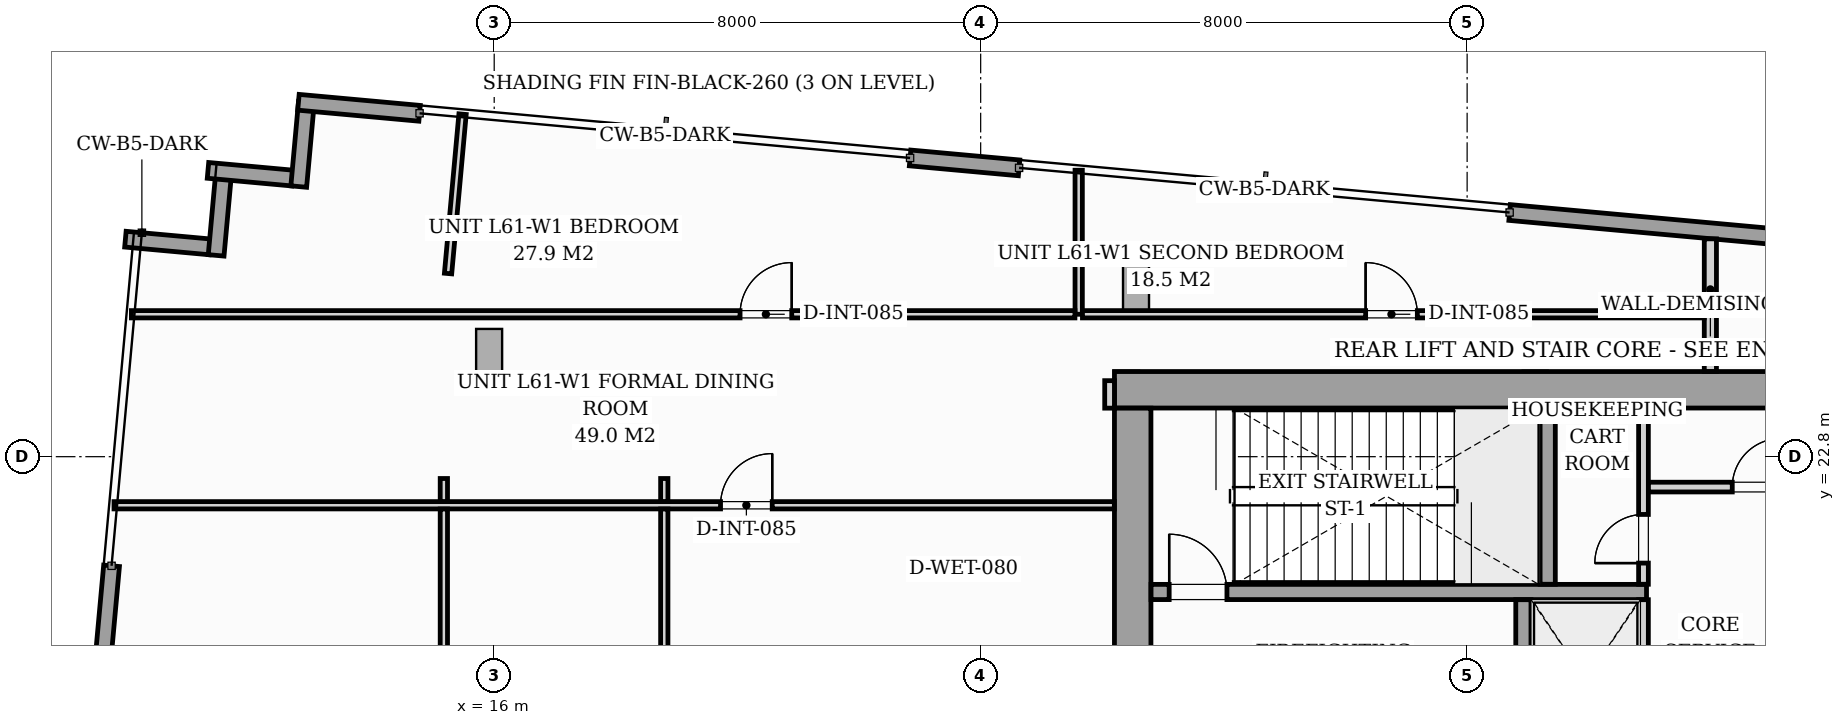
"""IFC4 building model, lengths in metres.
Left out: names, types, materials, properties, quantities, classifications, styles, units other than length and angle.
Written with IfcOpenShell. Run it as: python <this file> out.ifc"""

import sys

from ifc_helpers import new_model, si_unit, direction, frame, frame_2d, origin, origin_2d, place, context, subcontext, project, spatial, rectangle, i_section, extrude, source, transform, mapped, element, fill, save


model = new_model("IFC4")
c1 = context("Model", 3, precision=1e-05, world=origin(), true_north=direction((0.0, 1.0)))
c2 = subcontext(c1, "Body", "Model", "MODEL_VIEW")
j1 = project(units=[si_unit("LENGTHUNIT", "METRE"), si_unit("PLANEANGLEUNIT", "RADIAN")], contexts=[c1])
p1 = place(None, origin())
s1 = spatial("IfcSite", under=j1, at=p1, CompositionType="ELEMENT")
p2 = place(p1, origin())
s2 = spatial("IfcBuilding", under=s1, at=p2, CompositionType="ELEMENT")
p3 = place(p2, frame((0.0, 0.0, 211.4)))
s3 = spatial("IfcBuildingStorey", under=s2, at=p3, CompositionType="ELEMENT", Elevation=211.4)
m1 = source(origin(), c2, "Body", "SweptSolid", [
    extrude(i_section(OverallWidth=0.409, OverallDepth=0.425, WebThickness=0.033, FlangeThickness=0.052, FilletRadius=0.018, at=origin_2d()), origin(), (0.0, 0.0, 1.0), 5.196),
])
for number, where, z_axis, x_axis in (
    (1, (26.4, 24.0, 0.002), (0.0, 0.0, 1.0), (1.0, 0.0, 0.0)),
    (2, (33.12, 24.0, 0.002), (0.0, 0.0, 1.0), (1.0, 0.0, 0.0)),
):
    element("IfcColumn", number, at=place(p3, frame(where, z_axis=z_axis, x_axis=x_axis)), inside=s3, PredefinedType="PILASTER", context=c2, shape_type="MappedRepresentation", body=[
        mapped(m1, transform((0.0, 0.0, 0.0), scale=1.0)),
    ])
m2 = source(origin(), c2, "Body", "SweptSolid", [
    extrude(i_section(OverallWidth=0.427, OverallDepth=0.976, WebThickness=0.031, FlangeThickness=0.056, FilletRadius=0.024, at=origin_2d()), origin(), (0.0, 0.0, 1.0), 6.431),
])
p4 = place(p3, frame((16.533, 23.527, 0.167), z_axis=(-0.412482054012, 0.592964307558, 0.691557579005), x_axis=(0.39491439026, -0.567709881405, 0.722321337716)))
e3 = element("IfcColumn", 3, at=p4, inside=s3, PredefinedType="COLUMN", context=c2, shape_type="MappedRepresentation", body=[
    mapped(m2, transform((0.0, 0.0, 0.0), scale=1.0)),
])
m3 = source(origin(), c2, "Body", "SweptSolid", [
    extrude(i_section(OverallWidth=0.427, OverallDepth=0.976, WebThickness=0.031, FlangeThickness=0.056, FilletRadius=0.024, at=origin_2d()), origin(), (0.0, 0.0, 1.0), 5.885),
])
p5 = place(p3, frame((27.409, 25.418, 0.151), z_axis=(-0.619606937299, 0.191959912881, 0.761077285889), x_axis=(0.7269877698, -0.225227479803, 0.648661209649)))
e4 = element("IfcColumn", 4, at=p5, inside=s3, PredefinedType="COLUMN", context=c2, shape_type="MappedRepresentation", body=[
    mapped(m3, transform((0.0, 0.0, 0.0), scale=1.0)),
])
m4 = source(origin(), c2, "Body", "SweptSolid", [
    extrude(i_section(OverallWidth=0.427, OverallDepth=0.976, WebThickness=0.031, FlangeThickness=0.056, FilletRadius=0.024, at=origin_2d()), origin(), (0.0, 0.0, 1.0), 6.395),
])
p6 = place(p3, frame((38.26, 25.49, 0.166), z_axis=(-0.717757295801, 0.029854061237, 0.69565307399), x_axis=(0.695052106108, -0.028909672197, 0.718377895434)))
e5 = element("IfcColumn", 5, at=p6, inside=s3, PredefinedType="COLUMN", context=c2, shape_type="MappedRepresentation", body=[
    mapped(m4, transform((0.0, 0.0, 0.0), scale=1.0)),
])
m5 = source(origin(), c2, "Body", "SweptSolid", [
    extrude(i_section(OverallWidth=0.427, OverallDepth=0.976, WebThickness=0.031, FlangeThickness=0.056, FilletRadius=0.024, at=origin_2d()), origin(), (0.0, 0.0, 1.0), 7.437),
])
p7 = place(p3, frame((14.865, 15.359, 0.184), z_axis=(-0.53624427181, 0.600393978381, 0.593269880977), x_axis=(0.395200173603, -0.442477089191, 0.805003632492)))
e6 = element("IfcColumn", 6, at=p7, inside=s3, PredefinedType="COLUMN", context=c2, shape_type="MappedRepresentation", body=[
    mapped(m5, transform((0.0, 0.0, 0.0), scale=1.0)),
])
p8 = place(p3, frame((9.544, 19.213, 0.0), z_axis=(0.0, 0.0, 1.0), x_axis=(0.090731396305, 0.995875400703, 0.0)))
e7 = element("IfcWall", 7, at=p8, inside=s3, PredefinedType="STANDARD", context=c2, shape_type="SweptSolid", body=[
    extrude(rectangle(XDim=1.8, YDim=0.26, at=frame_2d((0.9, 0.0))), origin(), (0.0, 0.0, 1.0), 4.78),
])
for number, where, z_axis, x_axis in (
    (8, (9.935, 26.377, 0.0), (0.0, 0.0, 1.0), (0.996, -0.091, 0.0)),
    (9, (11.427, 26.111, 0.0), (0.0, 0.0, 1.0), (0.091, 0.996, 0.0)),
):
    element("IfcWall", number, at=place(p3, frame(where, z_axis=z_axis, x_axis=x_axis)), inside=s3, PredefinedType="STANDARD", context=c2, shape_type="SweptSolid", body=[
        extrude(rectangle(XDim=1.395, YDim=0.26, at=frame_2d((0.698, 0.0))), origin(), (0.0, 0.0, 1.0), 4.78),
    ])
p9 = place(p3, frame((11.293, 27.508, 0.0), z_axis=(0.0, 0.0, 1.0), x_axis=(0.995883159782, -0.090646191665, 0.0)))
e10 = element("IfcWall", 10, at=p9, inside=s3, PredefinedType="STANDARD", context=c2, shape_type="SweptSolid", body=[
    extrude(rectangle(XDim=1.395, YDim=0.26, at=frame_2d((0.698, 0.0))), origin(), (0.0, 0.0, 1.0), 4.78),
])
p10 = place(p3, frame((12.785, 27.242, 0.0), z_axis=(0.0, 0.0, 1.0), x_axis=(0.090472632758, 0.995898942023, 0.0)))
e11 = element("IfcWall", 11, at=p10, inside=s3, PredefinedType="STANDARD", context=c2, shape_type="SweptSolid", body=[
    extrude(rectangle(XDim=1.395, YDim=0.26, at=frame_2d((0.698, 0.0))), origin(), (0.0, 0.0, 1.0), 4.78),
])
p11 = place(p3, frame((12.781, 28.628, 0.0), z_axis=(0.0, 0.0, 1.0), x_axis=(0.995879187782, -0.090689819405, 0.0)))
e12 = element("IfcWall", 12, at=p11, inside=s3, PredefinedType="STANDARD", context=c2, shape_type="SweptSolid", body=[
    extrude(rectangle(XDim=2.0, YDim=0.26, at=frame_2d((1.0, 0.0))), origin(), (0.0, 0.0, 1.0), 4.78),
])
p12 = place(p3, frame((22.839, 27.713, 0.0), z_axis=(0.0, 0.0, 1.0), x_axis=(0.995887646227, -0.090596887877, 0.0)))
e13 = element("IfcWall", 13, at=p12, inside=s3, PredefinedType="STANDARD", context=c2, shape_type="SweptSolid", body=[
    extrude(rectangle(XDim=1.8, YDim=0.26, at=frame_2d((0.9, 0.0))), origin(), (0.0, 0.0, 1.0), 4.78),
])
p13 = place(p3, frame((32.698, 26.815, 0.0), z_axis=(0.0, 0.0, 1.0), x_axis=(0.995885769499, -0.09061751547, 0.0)))
e14 = element("IfcWall", 14, at=p13, inside=s3, PredefinedType="STANDARD", context=c2, shape_type="SweptSolid", body=[
    extrude(rectangle(XDim=6.73, YDim=0.26, at=frame_2d((3.365, 0.0))), origin(), (0.0, 0.0, 1.0), 4.78),
])
p14 = place(p3, frame((26.2, 23.9, 0.0), z_axis=(0.0, 0.0, 1.0), x_axis=(1.0, 0.0, 0.0)))
e15 = element("IfcWall", 15, at=p14, inside=s3, PredefinedType="SHEAR", context=c2, shape_type="SweptSolid", body=[
    extrude(rectangle(XDim=19.6, YDim=0.6, at=frame_2d((9.8, 0.0))), origin(), (0.0, 0.0, 1.0), 5.2),
])
p15 = place(p3, frame((26.5, 17.802, 0.0), z_axis=(0.0, 0.0, 1.0), x_axis=(0.0, 1.0, 0.0)))
e16 = element("IfcWall", 16, at=p15, inside=s3, PredefinedType="SHEAR", context=c2, shape_type="SweptSolid", body=[
    extrude(rectangle(XDim=5.796, YDim=0.6, at=frame_2d((2.898, 0.0))), origin(), (0.0, 0.0, 1.0), 5.2),
])
p16 = place(p3, frame((26.802, 20.575, 0.0), z_axis=(0.0, 0.0, 1.0), x_axis=(1.0, 0.0, 0.0)))
e17 = element("IfcWall", 17, at=p16, inside=s3, PredefinedType="SOLIDWALL", context=c2, shape_type="SweptSolid", body=[
    extrude(rectangle(XDim=8.148, YDim=0.25, at=frame_2d((4.074, 0.0))), origin(), (0.0, 0.0, 1.0), 5.2),
])
p17 = place(p16, frame((0.298, 0.0, 0.0)))
e18 = element("IfcOpeningElement", 18, at=p17, cuts=e17, PredefinedType="OPENING", context=c2, shape_type="SweptSolid", body=[
    extrude(rectangle(XDim=0.95, YDim=2.06, at=frame_2d((0.475, 1.03))), frame((0.0, 0.135, 0.0), z_axis=(0.0, -1.0, 0.0), x_axis=(1.0, 0.0, 0.0)), (0.0, 0.0, 1.0), 0.27),
])
p18 = place(p3, frame((33.325, 20.702, 0.0), z_axis=(0.0, 0.0, 1.0), x_axis=(0.0, 1.0, 0.0)))
e19 = element("IfcWall", 19, at=p18, inside=s3, PredefinedType="SOLIDWALL", context=c2, shape_type="SweptSolid", body=[
    extrude(rectangle(XDim=2.896, YDim=0.25, at=frame_2d((1.448, 0.0))), origin(), (0.0, 0.0, 1.0), 5.2),
])
p19 = place(p3, frame((32.925, 17.802, 0.0), z_axis=(0.0, 0.0, 1.0), x_axis=(0.0, 1.0, 0.0)))
e20 = element("IfcWall", 20, at=p19, inside=s3, PredefinedType="SOLIDWALL", context=c2, shape_type="SweptSolid", body=[
    extrude(rectangle(XDim=2.646, YDim=0.25, at=frame_2d((1.323, 0.0))), origin(), (0.0, 0.0, 1.0), 5.2),
])
p20 = place(p19, frame((0.548, 0.0, 0.0)))
e21 = element("IfcOpeningElement", 21, at=p20, cuts=e20, PredefinedType="OPENING", context=c2, shape_type="SweptSolid", body=[
    extrude(rectangle(XDim=1.1, YDim=2.08, at=frame_2d((0.55, 1.04))), frame((0.0, 0.135, 0.0), z_axis=(0.0, -1.0, 0.0), x_axis=(1.0, 0.0, 0.0)), (0.0, 0.0, 1.0), 0.27),
])
p21 = place(p3, frame((34.9, 17.802, 0.0), z_axis=(0.0, 0.0, 1.0), x_axis=(0.0, 1.0, 0.0)))
e22 = element("IfcWall", 22, at=p21, inside=s3, PredefinedType="PARTITIONING", context=c2, shape_type="SweptSolid", body=[
    extrude(rectangle(XDim=2.646, YDim=0.16, at=frame_2d((1.323, 0.0))), origin(), (0.0, 0.0, 1.0), 4.78),
])
p22 = place(p3, frame((34.9, 20.702, 0.0), z_axis=(0.0, 0.0, 1.0), x_axis=(0.0, 1.0, 0.0)))
e23 = element("IfcWall", 23, at=p22, inside=s3, PredefinedType="PARTITIONING", context=c2, shape_type="SweptSolid", body=[
    extrude(rectangle(XDim=2.896, YDim=0.16, at=frame_2d((1.448, 0.0))), origin(), (0.0, 0.0, 1.0), 4.78),
])
p23 = place(p22, frame((0.348, 0.0, 0.0)))
e24 = element("IfcOpeningElement", 24, at=p23, cuts=e23, PredefinedType="OPENING", context=c2, shape_type="SweptSolid", body=[
    extrude(rectangle(XDim=0.8, YDim=2.05, at=frame_2d((0.4, 1.025))), frame((0.0, 0.09, 0.0), z_axis=(0.0, -1.0, 0.0), x_axis=(1.0, 0.0, 0.0)), (0.0, 0.0, 1.0), 0.18),
])
p24 = place(p3, frame((34.982, 22.3, 0.0), z_axis=(0.0, 0.0, 1.0), x_axis=(1.0, 0.0, 0.0)))
e25 = element("IfcWall", 25, at=p24, inside=s3, PredefinedType="PARTITIONING", context=c2, shape_type="SweptSolid", body=[
    extrude(rectangle(XDim=3.566, YDim=0.16, at=frame_2d((1.783, 0.0))), origin(), (0.0, 0.0, 1.0), 4.78),
])
p25 = place(p24, frame((1.378, 0.0, 0.0)))
e26 = element("IfcOpeningElement", 26, at=p25, cuts=e25, PredefinedType="OPENING", context=c2, shape_type="SweptSolid", body=[
    extrude(rectangle(XDim=0.8, YDim=2.05, at=frame_2d((0.4, 1.025))), frame((0.0, 0.09, 0.0), z_axis=(0.0, -1.0, 0.0), x_axis=(1.0, 0.0, 0.0)), (0.0, 0.0, 1.0), 0.18),
])
p26 = place(p3, frame((26.12, 23.598, 0.0), z_axis=(0.0, 0.0, 1.0), x_axis=(0.0, 1.0, 0.0)))
e27 = element("IfcWall", 27, at=p26, inside=s3, PredefinedType="PARTITIONING", context=c2, shape_type="SweptSolid", body=[
    extrude(rectangle(XDim=0.452, YDim=0.16, at=frame_2d((0.226, 0.0))), origin(), (0.0, 0.0, 1.0), 4.78),
])
p27 = place(p3, frame((36.0, 24.202, 0.0), z_axis=(0.0, 0.0, 1.0), x_axis=(0.0, 1.0, 0.0)))
e28 = element("IfcWall", 28, at=p27, inside=s3, PredefinedType="PARTITIONING", context=c2, shape_type="SweptSolid", body=[
    extrude(rectangle(XDim=2.181, YDim=0.2, at=frame_2d((1.09, 0.0))), origin(), (0.0, 0.0, 1.0), 4.78),
])
p28 = place(p3, frame((25.612, 25.142, 0.0), z_axis=(0.0, 0.0, 1.0), x_axis=(0.0, 1.0, 0.0)))
e29 = element("IfcWall", 29, at=p28, inside=s3, PredefinedType="PARTITIONING", context=c2, shape_type="SweptSolid", body=[
    extrude(rectangle(XDim=2.368, YDim=0.12, at=frame_2d((1.184, 0.0))), origin(), (0.0, 0.0, 1.0), 4.78),
])
p29 = place(p3, frame((10.034, 25.142, 0.0), z_axis=(0.0, 0.0, 1.0), x_axis=(1.0, 0.0, 0.0)))
e30 = element("IfcWall", 30, at=p29, inside=s3, PredefinedType="PARTITIONING", context=c2, shape_type="SweptSolid", body=[
    extrude(rectangle(XDim=15.516, YDim=0.12, at=frame_2d((7.758, 0.0))), origin(), (0.0, 0.0, 1.0), 4.78),
])
p30 = place(p29, frame((10.01, 0.0, 0.0)))
e31 = element("IfcOpeningElement", 31, at=p30, cuts=e30, PredefinedType="OPENING", context=c2, shape_type="SweptSolid", body=[
    extrude(rectangle(XDim=0.85, YDim=2.05, at=frame_2d((0.425, 1.025))), frame((0.0, 0.07, 0.0), z_axis=(0.0, -1.0, 0.0), x_axis=(1.0, 0.0, 0.0)), (0.0, 0.0, 1.0), 0.14),
])
p31 = place(p3, frame((25.674, 25.142, 0.0), z_axis=(0.0, 0.0, 1.0), x_axis=(1.0, 0.0, 0.0)))
e32 = element("IfcWall", 32, at=p31, inside=s3, PredefinedType="PARTITIONING", context=c2, shape_type="SweptSolid", body=[
    extrude(rectangle(XDim=10.224, YDim=0.12, at=frame_2d((5.112, 0.0))), origin(), (0.0, 0.0, 1.0), 4.78),
])
p32 = place(p31, frame((4.657, 0.0, 0.0)))
e33 = element("IfcOpeningElement", 33, at=p32, cuts=e32, PredefinedType="OPENING", context=c2, shape_type="SweptSolid", body=[
    extrude(rectangle(XDim=0.85, YDim=2.05, at=frame_2d((0.425, 1.025))), frame((0.0, 0.07, 0.0), z_axis=(0.0, -1.0, 0.0), x_axis=(1.0, 0.0, 0.0)), (0.0, 0.0, 1.0), 0.14),
])
p33 = place(p3, frame((9.748, 22.001, 0.0), z_axis=(0.0, 0.0, 1.0), x_axis=(1.0, 0.0, 0.0)))
e34 = element("IfcWall", 34, at=p33, inside=s3, PredefinedType="PARTITIONING", context=c2, shape_type="SweptSolid", body=[
    extrude(rectangle(XDim=16.45, YDim=0.12, at=frame_2d((8.225, 0.0))), origin(), (0.0, 0.0, 1.0), 4.78),
])
p34 = place(p33, frame((9.974, 0.0, 0.0)))
e35 = element("IfcOpeningElement", 35, at=p34, cuts=e34, PredefinedType="OPENING", context=c2, shape_type="SweptSolid", body=[
    extrude(rectangle(XDim=0.85, YDim=2.05, at=frame_2d((0.425, 1.025))), frame((0.0, 0.07, 0.0), z_axis=(0.0, -1.0, 0.0), x_axis=(1.0, 0.0, 0.0)), (0.0, 0.0, 1.0), 0.14),
])
p35 = place(p3, frame((15.172, 11.892, 0.0), z_axis=(0.0, 0.0, 1.0), x_axis=(0.0, 1.0, 0.0)))
e36 = element("IfcWall", 36, at=p35, inside=s3, PredefinedType="PARTITIONING", context=c2, shape_type="SweptSolid", body=[
    extrude(rectangle(XDim=10.047, YDim=0.12, at=frame_2d((5.023, 0.0))), origin(), (0.0, 0.0, 1.0), 4.78),
])
p36 = place(p35, frame((6.02, 0.0, 0.0)))
e37 = element("IfcOpeningElement", 37, at=p36, cuts=e36, PredefinedType="OPENING", context=c2, shape_type="SweptSolid", body=[
    extrude(rectangle(XDim=0.85, YDim=2.05, at=frame_2d((0.425, 1.025))), frame((0.0, 0.07, 0.0), z_axis=(0.0, -1.0, 0.0), x_axis=(1.0, 0.0, 0.0)), (0.0, 0.0, 1.0), 0.14),
])
p37 = place(p3, frame((15.172, 22.063, 0.0), z_axis=(0.0, 0.0, 1.0), x_axis=(0.0, 1.0, 0.0)))
e38 = element("IfcWall", 38, at=p37, inside=s3, PredefinedType="PARTITIONING", context=c2, shape_type="SweptSolid", body=[
    extrude(rectangle(XDim=0.378, YDim=0.12, at=frame_2d((0.189, 0.0))), origin(), (0.0, 0.0, 1.0), 4.78),
])
p38 = place(p3, frame((18.797, 11.892, 0.0), z_axis=(0.0, 0.0, 1.0), x_axis=(0.0, 1.0, 0.0)))
e39 = element("IfcWall", 39, at=p38, inside=s3, PredefinedType="PARTITIONING", context=c2, shape_type="SweptSolid", body=[
    extrude(rectangle(XDim=10.047, YDim=0.12, at=frame_2d((5.023, 0.0))), origin(), (0.0, 0.0, 1.0), 4.78),
])
p39 = place(p38, frame((4.598, 0.0, 0.0)))
e40 = element("IfcOpeningElement", 40, at=p39, cuts=e39, PredefinedType="OPENING", context=c2, shape_type="SweptSolid", body=[
    extrude(rectangle(XDim=0.85, YDim=2.05, at=frame_2d((0.425, 1.025))), frame((0.0, 0.07, 0.0), z_axis=(0.0, -1.0, 0.0), x_axis=(1.0, 0.0, 0.0)), (0.0, 0.0, 1.0), 0.14),
])
p40 = place(p3, frame((18.797, 22.063, 0.0), z_axis=(0.0, 0.0, 1.0), x_axis=(0.0, 1.0, 0.0)))
e41 = element("IfcWall", 41, at=p40, inside=s3, PredefinedType="PARTITIONING", context=c2, shape_type="SweptSolid", body=[
    extrude(rectangle(XDim=0.378, YDim=0.12, at=frame_2d((0.189, 0.0))), origin(), (0.0, 0.0, 1.0), 4.78),
])
p41 = place(p3, frame((15.241, 25.812, 0.0), z_axis=(0.0, 0.0, 1.0), x_axis=(0.090552476701, 0.995891685357, 0.0)))
e42 = element("IfcWall", 42, at=p41, inside=s3, PredefinedType="PARTITIONING", context=c2, shape_type="SweptSolid", body=[
    extrude(rectangle(XDim=2.631, YDim=0.12, at=frame_2d((1.316, 0.0))), origin(), (0.0, 0.0, 1.0), 4.78),
])
m6 = source(origin(), c2, "Body", "SweptSolid", [
    extrude(rectangle(XDim=0.95, YDim=2.06, at=frame_2d((0.475, 1.03))), frame((0.0, 0.025, 0.0), z_axis=(0.0, -1.0, 0.0), x_axis=(1.0, 0.0, 0.0)), (0.0, 0.0, 1.0), 0.05),
])
p42 = place(p17, origin())
e43 = element("IfcDoor", 43, at=p42, inside=s3, OperationType="SINGLE_SWING_LEFT", PredefinedType="DOOR", context=c2, shape_type="MappedRepresentation", body=[
    mapped(m6, transform((0.0, 0.0, 0.0), scale=1.0)),
])
fill(e18, e43)
m7 = source(origin(), c2, "Body", "SweptSolid", [
    extrude(rectangle(XDim=0.8, YDim=2.05, at=frame_2d((0.4, 1.025))), frame((0.0, 0.025, 0.0), z_axis=(0.0, -1.0, 0.0), x_axis=(1.0, 0.0, 0.0)), (0.0, 0.0, 1.0), 0.05),
])
p43 = place(p23, origin())
e44 = element("IfcDoor", 44, at=p43, inside=s3, OperationType="SINGLE_SWING_LEFT", PredefinedType="DOOR", context=c2, shape_type="MappedRepresentation", body=[
    mapped(m7, transform((0.0, 0.0, 0.0), scale=1.0)),
])
fill(e24, e44)
p44 = place(p25, origin())
e45 = element("IfcDoor", 45, at=p44, inside=s3, OperationType="SINGLE_SWING_RIGHT", PredefinedType="DOOR", context=c2, shape_type="MappedRepresentation", body=[
    mapped(m7, transform((0.0, 0.0, 0.0), scale=1.0)),
])
fill(e26, e45)
m8 = source(origin(), c2, "Body", "SweptSolid", [
    extrude(rectangle(XDim=0.85, YDim=2.05, at=frame_2d((0.425, 1.025))), frame((0.0, 0.025, 0.0), z_axis=(0.0, -1.0, 0.0), x_axis=(1.0, 0.0, 0.0)), (0.0, 0.0, 1.0), 0.05),
])
p45 = place(p30, origin())
e46 = element("IfcDoor", 46, at=p45, inside=s3, OperationType="SINGLE_SWING_RIGHT", PredefinedType="DOOR", context=c2, shape_type="MappedRepresentation", body=[
    mapped(m8, transform((0.0, 0.0, 0.0), scale=1.0)),
])
fill(e31, e46)
p46 = place(p32, origin())
e47 = element("IfcDoor", 47, at=p46, inside=s3, OperationType="SINGLE_SWING_LEFT", PredefinedType="DOOR", context=c2, shape_type="MappedRepresentation", body=[
    mapped(m8, transform((0.0, 0.0, 0.0), scale=1.0)),
])
fill(e33, e47)
p47 = place(p34, origin())
e48 = element("IfcDoor", 48, at=p47, inside=s3, OperationType="SINGLE_SWING_RIGHT", PredefinedType="DOOR", context=c2, shape_type="MappedRepresentation", body=[
    mapped(m8, transform((0.0, 0.0, 0.0), scale=1.0)),
])
fill(e35, e48)
save(model, sys.argv[1])
